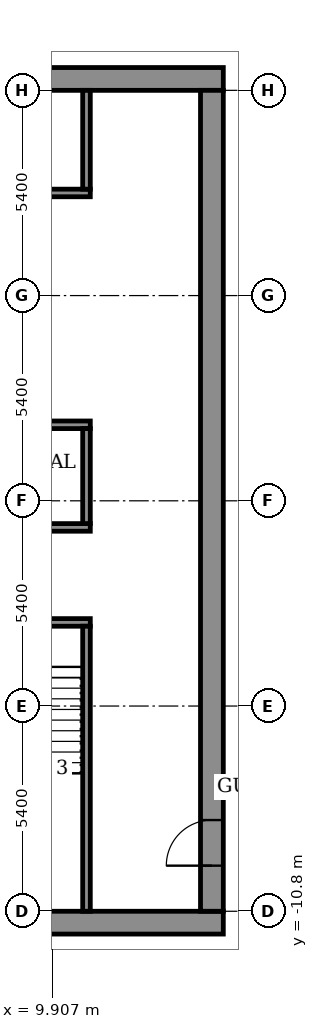
"""IFC4 building model, lengths in metres.
Left out: names, types, materials, properties, quantities, classifications, styles, units other than length and angle.
Written with IfcOpenShell. Run it as: python <this file> out.ifc"""

import sys

from ifc_helpers import new_model, si_unit, direction, frame, frame_2d, origin, place, context, subcontext, project, spatial, rectangle, extrude, element, fill, save


model = new_model("IFC4")
c1 = context("Model", 3, precision=1e-05, world=origin(), true_north=direction((0.0, 1.0)))
c2 = subcontext(c1, "Body", "Model", "MODEL_VIEW")
j1 = project(units=[si_unit("LENGTHUNIT", "METRE"), si_unit("PLANEANGLEUNIT", "RADIAN")], contexts=[c1])
p1 = place(None, origin())
s1 = spatial("IfcSite", under=j1, at=p1, CompositionType="ELEMENT")
p2 = place(p1, origin())
s2 = spatial("IfcBuilding", under=s1, at=p2, CompositionType="ELEMENT")
p3 = place(p2, frame((0.0, 0.0, 309.7)))
s3 = spatial("IfcBuildingStorey", under=s2, at=p3, CompositionType="ELEMENT", Elevation=309.7)
for number, where, z_axis, x_axis in (
    (1, (-14.4, -11.1, 0.0), (0.0, 0.0, 1.0), (1.0, 0.0, 0.0)),
    (2, (-14.4, 11.1, 0.0), (0.0, 0.0, 1.0), (1.0, 0.0, 0.0)),
):
    element("IfcWall", number, at=place(p3, frame(where, z_axis=z_axis, x_axis=x_axis)), inside=s3, PredefinedType="SHEAR", context=c2, shape_type="SweptSolid", body=[
        extrude(rectangle(XDim=28.8, YDim=0.6, at=frame_2d((14.4, 0.0))), origin(), (0.0, 0.0, 1.0), 3.6),
    ])
p4 = place(p3, frame((14.1, -10.8, 0.0), z_axis=(0.0, 0.0, 1.0), x_axis=(0.0, 1.0, 0.0)))
e3 = element("IfcWall", 3, at=p4, inside=s3, PredefinedType="SHEAR", context=c2, shape_type="SweptSolid", body=[
    extrude(rectangle(XDim=21.6, YDim=0.6, at=frame_2d((10.8, 0.0))), origin(), (0.0, 0.0, 1.0), 3.6),
])
p5 = place(p4, frame((1.2, 0.0, 0.0)))
e4 = element("IfcOpeningElement", 4, at=p5, cuts=e3, PredefinedType="OPENING", context=c2, shape_type="SweptSolid", body=[
    extrude(rectangle(XDim=1.2, YDim=2.1, at=frame_2d((0.6, 1.05))), frame((0.0, 0.31, 0.0), z_axis=(0.0, -1.0, 0.0), x_axis=(1.0, 0.0, 0.0)), (0.0, 0.0, 1.0), 0.62),
])
p6 = place(p3, frame((-10.9, -3.2, 0.0), z_axis=(0.0, 0.0, 1.0), x_axis=(1.0, 0.0, 0.0)))
e5 = element("IfcWall", 5, at=p6, inside=s3, PredefinedType="SHEAR", context=c2, shape_type="SweptSolid", body=[
    extrude(rectangle(XDim=21.8, YDim=0.2, at=frame_2d((10.9, 0.0))), origin(), (0.0, 0.0, 1.0), 3.05),
])
p7 = place(p6, frame((1.075, 0.0, 0.0)))
e6 = element("IfcOpeningElement", 6, at=p7, cuts=e5, PredefinedType="OPENING", context=c2, shape_type="SweptSolid", body=[
    extrude(rectangle(XDim=1.1, YDim=2.1, at=frame_2d((0.55, 1.05))), frame((0.0, 0.11, 0.0), z_axis=(0.0, -1.0, 0.0), x_axis=(1.0, 0.0, 0.0)), (0.0, 0.0, 1.0), 0.22),
])
p8 = place(p6, frame((10.325, 0.0, 0.0)))
e7 = element("IfcOpeningElement", 7, at=p8, cuts=e5, PredefinedType="OPENING", context=c2, shape_type="SweptSolid", body=[
    extrude(rectangle(XDim=1.1, YDim=2.1, at=frame_2d((0.55, 1.05))), frame((0.0, 0.11, 0.0), z_axis=(0.0, -1.0, 0.0), x_axis=(1.0, 0.0, 0.0)), (0.0, 0.0, 1.0), 0.22),
])
p9 = place(p6, frame((19.625, 0.0, 0.0)))
e8 = element("IfcOpeningElement", 8, at=p9, cuts=e5, PredefinedType="OPENING", context=c2, shape_type="SweptSolid", body=[
    extrude(rectangle(XDim=1.1, YDim=2.1, at=frame_2d((0.55, 1.05))), frame((0.0, 0.11, 0.0), z_axis=(0.0, -1.0, 0.0), x_axis=(1.0, 0.0, 0.0)), (0.0, 0.0, 1.0), 0.22),
])
p10 = place(p6, frame((5.7, 0.0, 0.0)))
e9 = element("IfcOpeningElement", 9, at=p10, cuts=e5, PredefinedType="OPENING", context=c2, shape_type="SweptSolid", body=[
    extrude(rectangle(XDim=1.1, YDim=2.1, at=frame_2d((0.55, 1.05))), frame((0.0, 0.11, 0.0), z_axis=(0.0, -1.0, 0.0), x_axis=(1.0, 0.0, 0.0)), (0.0, 0.0, 1.0), 0.22),
])
p11 = place(p6, frame((14.975, 0.0, 0.0)))
e10 = element("IfcOpeningElement", 10, at=p11, cuts=e5, PredefinedType="OPENING", context=c2, shape_type="SweptSolid", body=[
    extrude(rectangle(XDim=1.1, YDim=2.1, at=frame_2d((0.55, 1.05))), frame((0.0, 0.11, 0.0), z_axis=(0.0, -1.0, 0.0), x_axis=(1.0, 0.0, 0.0)), (0.0, 0.0, 1.0), 0.22),
])
p12 = place(p3, frame((-10.9, -0.7, 0.0), z_axis=(0.0, 0.0, 1.0), x_axis=(1.0, 0.0, 0.0)))
e11 = element("IfcWall", 11, at=p12, inside=s3, PredefinedType="SHEAR", context=c2, shape_type="SweptSolid", body=[
    extrude(rectangle(XDim=21.8, YDim=0.2, at=frame_2d((10.9, 0.0))), origin(), (0.0, 0.0, 1.0), 3.05),
])
p13 = place(p3, frame((-10.9, 2.0, 0.0), z_axis=(0.0, 0.0, 1.0), x_axis=(1.0, 0.0, 0.0)))
e12 = element("IfcWall", 12, at=p13, inside=s3, PredefinedType="SHEAR", context=c2, shape_type="SweptSolid", body=[
    extrude(rectangle(XDim=21.8, YDim=0.2, at=frame_2d((10.9, 0.0))), origin(), (0.0, 0.0, 1.0), 3.05),
])
p14 = place(p13, frame((4.95, 0.0, 0.0)))
e13 = element("IfcOpeningElement", 13, at=p14, cuts=e12, PredefinedType="OPENING", context=c2, shape_type="SweptSolid", body=[
    extrude(rectangle(XDim=1.1, YDim=2.1, at=frame_2d((0.55, 1.05))), frame((0.0, 0.11, 0.0), z_axis=(0.0, -1.0, 0.0), x_axis=(1.0, 0.0, 0.0)), (0.0, 0.0, 1.0), 0.22),
])
p15 = place(p13, frame((7.65, 0.0, 0.0)))
e14 = element("IfcOpeningElement", 14, at=p15, cuts=e12, PredefinedType="OPENING", context=c2, shape_type="SweptSolid", body=[
    extrude(rectangle(XDim=1.1, YDim=2.1, at=frame_2d((0.55, 1.05))), frame((0.0, 0.11, 0.0), z_axis=(0.0, -1.0, 0.0), x_axis=(1.0, 0.0, 0.0)), (0.0, 0.0, 1.0), 0.22),
])
p16 = place(p13, frame((10.35, 0.0, 0.0)))
e15 = element("IfcOpeningElement", 15, at=p16, cuts=e12, PredefinedType="OPENING", context=c2, shape_type="SweptSolid", body=[
    extrude(rectangle(XDim=1.1, YDim=2.1, at=frame_2d((0.55, 1.05))), frame((0.0, 0.11, 0.0), z_axis=(0.0, -1.0, 0.0), x_axis=(1.0, 0.0, 0.0)), (0.0, 0.0, 1.0), 0.22),
])
p17 = place(p13, frame((1.675, 0.0, 0.0)))
e16 = element("IfcOpeningElement", 16, at=p17, cuts=e12, PredefinedType="OPENING", context=c2, shape_type="SweptSolid", body=[
    extrude(rectangle(XDim=0.9, YDim=2.1, at=frame_2d((0.45, 1.05))), frame((0.0, 0.11, 0.0), z_axis=(0.0, -1.0, 0.0), x_axis=(1.0, 0.0, 0.0)), (0.0, 0.0, 1.0), 0.22),
])
p18 = place(p13, frame((14.5, 0.0, 0.0)))
e17 = element("IfcOpeningElement", 17, at=p18, cuts=e12, PredefinedType="OPENING", context=c2, shape_type="SweptSolid", body=[
    extrude(rectangle(XDim=0.9, YDim=2.1, at=frame_2d((0.45, 1.05))), frame((0.0, 0.11, 0.0), z_axis=(0.0, -1.0, 0.0), x_axis=(1.0, 0.0, 0.0)), (0.0, 0.0, 1.0), 0.22),
])
p19 = place(p13, frame((19.225, 0.0, 0.0)))
e18 = element("IfcOpeningElement", 18, at=p19, cuts=e12, PredefinedType="OPENING", context=c2, shape_type="SweptSolid", body=[
    extrude(rectangle(XDim=0.9, YDim=2.1, at=frame_2d((0.45, 1.05))), frame((0.0, 0.11, 0.0), z_axis=(0.0, -1.0, 0.0), x_axis=(1.0, 0.0, 0.0)), (0.0, 0.0, 1.0), 0.22),
])
p20 = place(p3, frame((-10.9, 8.1, 0.0), z_axis=(0.0, 0.0, 1.0), x_axis=(1.0, 0.0, 0.0)))
e19 = element("IfcWall", 19, at=p20, inside=s3, PredefinedType="SHEAR", context=c2, shape_type="SweptSolid", body=[
    extrude(rectangle(XDim=21.8, YDim=0.2, at=frame_2d((10.9, 0.0))), origin(), (0.0, 0.0, 1.0), 3.05),
])
p21 = place(p20, frame((4.95, 0.0, 0.0)))
e20 = element("IfcOpeningElement", 20, at=p21, cuts=e19, PredefinedType="OPENING", context=c2, shape_type="SweptSolid", body=[
    extrude(rectangle(XDim=1.1, YDim=2.1, at=frame_2d((0.55, 1.05))), frame((0.0, 0.11, 0.0), z_axis=(0.0, -1.0, 0.0), x_axis=(1.0, 0.0, 0.0)), (0.0, 0.0, 1.0), 0.22),
])
p22 = place(p20, frame((7.65, 0.0, 0.0)))
e21 = element("IfcOpeningElement", 21, at=p22, cuts=e19, PredefinedType="OPENING", context=c2, shape_type="SweptSolid", body=[
    extrude(rectangle(XDim=1.1, YDim=2.1, at=frame_2d((0.55, 1.05))), frame((0.0, 0.11, 0.0), z_axis=(0.0, -1.0, 0.0), x_axis=(1.0, 0.0, 0.0)), (0.0, 0.0, 1.0), 0.22),
])
p23 = place(p20, frame((10.35, 0.0, 0.0)))
e22 = element("IfcOpeningElement", 22, at=p23, cuts=e19, PredefinedType="OPENING", context=c2, shape_type="SweptSolid", body=[
    extrude(rectangle(XDim=1.1, YDim=2.1, at=frame_2d((0.55, 1.05))), frame((0.0, 0.11, 0.0), z_axis=(0.0, -1.0, 0.0), x_axis=(1.0, 0.0, 0.0)), (0.0, 0.0, 1.0), 0.22),
])
p24 = place(p20, frame((1.675, 0.0, 0.0)))
e23 = element("IfcOpeningElement", 23, at=p24, cuts=e19, PredefinedType="OPENING", context=c2, shape_type="SweptSolid", body=[
    extrude(rectangle(XDim=0.9, YDim=2.1, at=frame_2d((0.45, 1.05))), frame((0.0, 0.11, 0.0), z_axis=(0.0, -1.0, 0.0), x_axis=(1.0, 0.0, 0.0)), (0.0, 0.0, 1.0), 0.22),
])
p25 = place(p20, frame((14.5, 0.0, 0.0)))
e24 = element("IfcOpeningElement", 24, at=p25, cuts=e19, PredefinedType="OPENING", context=c2, shape_type="SweptSolid", body=[
    extrude(rectangle(XDim=0.9, YDim=2.1, at=frame_2d((0.45, 1.05))), frame((0.0, 0.11, 0.0), z_axis=(0.0, -1.0, 0.0), x_axis=(1.0, 0.0, 0.0)), (0.0, 0.0, 1.0), 0.22),
])
p26 = place(p20, frame((19.225, 0.0, 0.0)))
e25 = element("IfcOpeningElement", 25, at=p26, cuts=e19, PredefinedType="OPENING", context=c2, shape_type="SweptSolid", body=[
    extrude(rectangle(XDim=0.9, YDim=2.1, at=frame_2d((0.45, 1.05))), frame((0.0, 0.11, 0.0), z_axis=(0.0, -1.0, 0.0), x_axis=(1.0, 0.0, 0.0)), (0.0, 0.0, 1.0), 0.22),
])
p27 = place(p3, frame((10.8, -10.8, 0.0), z_axis=(0.0, 0.0, 1.0), x_axis=(0.0, 1.0, 0.0)))
e26 = element("IfcWall", 26, at=p27, inside=s3, PredefinedType="SHEAR", context=c2, shape_type="SweptSolid", body=[
    extrude(rectangle(XDim=7.5, YDim=0.2, at=frame_2d((3.75, 0.0))), origin(), (0.0, 0.0, 1.0), 3.05),
])
p28 = place(p3, frame((10.8, -0.6, 0.0), z_axis=(0.0, 0.0, 1.0), x_axis=(0.0, 1.0, 0.0)))
e27 = element("IfcWall", 27, at=p28, inside=s3, PredefinedType="STANDARD", context=c2, shape_type="SweptSolid", body=[
    extrude(rectangle(XDim=2.5, YDim=0.2, at=frame_2d((1.25, 0.0))), origin(), (0.0, 0.0, 1.0), 3.05),
])
p29 = place(p3, frame((10.8, 8.2, 0.0), z_axis=(0.0, 0.0, 1.0), x_axis=(0.0, 1.0, 0.0)))
e28 = element("IfcWall", 28, at=p29, inside=s3, PredefinedType="STANDARD", context=c2, shape_type="SweptSolid", body=[
    extrude(rectangle(XDim=2.6, YDim=0.2, at=frame_2d((1.3, 0.0))), origin(), (0.0, 0.0, 1.0), 3.05),
])
p30 = place(p5, origin())
e29 = element("IfcDoor", 29, at=p30, inside=s3, OperationType="DOUBLE_DOOR_SINGLE_SWING", PredefinedType="DOOR", context=c2, shape_type="SweptSolid", body=[
    extrude(rectangle(XDim=1.2, YDim=2.1, at=frame_2d((0.6, 1.05))), frame((0.0, 0.025, 0.0), z_axis=(0.0, -1.0, 0.0), x_axis=(1.0, 0.0, 0.0)), (0.0, 0.0, 1.0), 0.05),
])
fill(e4, e29)
save(model, sys.argv[1])
